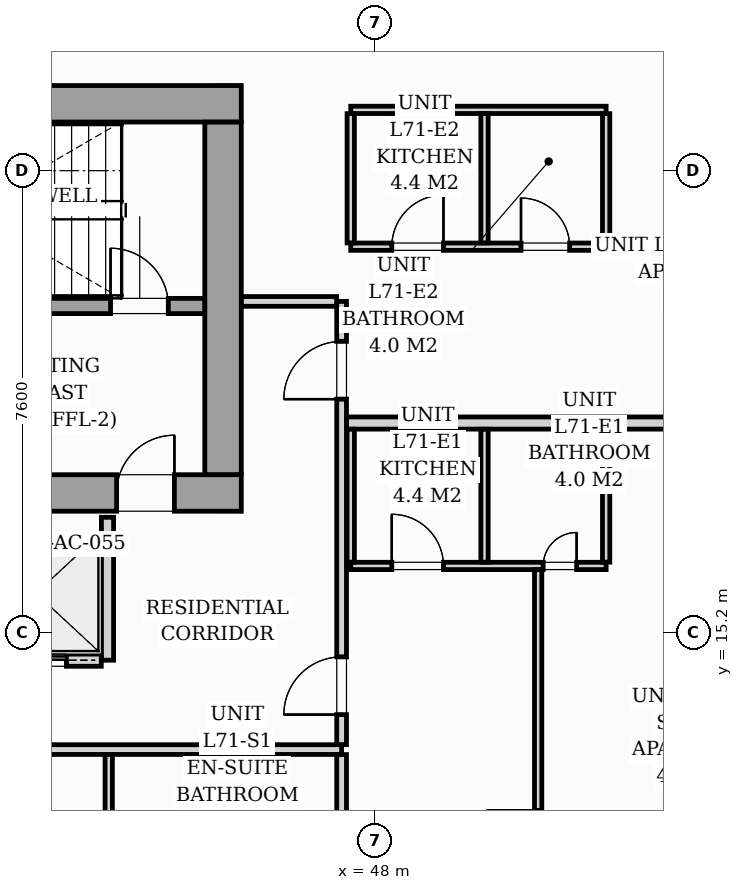
"""IFC4 building model, lengths in metres.
Left out: names, types, materials, properties, quantities, classifications, styles, units other than length and angle.
Written with IfcOpenShell. Run it as: python <this file> out.ifc"""

import sys

from ifc_helpers import new_model, si_unit, direction, frame, frame_2d, origin, origin_2d, place, context, subcontext, project, spatial, rectangle, i_section, extrude, source, transform, mapped, element, fill, save


model = new_model("IFC4")
c1 = context("Model", 3, precision=1e-05, world=origin(), true_north=direction((0.0, 1.0)))
c2 = subcontext(c1, "Body", "Model", "MODEL_VIEW")
j1 = project(units=[si_unit("LENGTHUNIT", "METRE"), si_unit("PLANEANGLEUNIT", "RADIAN")], contexts=[c1])
p1 = place(None, origin())
s1 = spatial("IfcSite", under=j1, at=p1, CompositionType="ELEMENT")
p2 = place(p1, origin())
s2 = spatial("IfcBuilding", under=s1, at=p2, CompositionType="ELEMENT")
p3 = place(p2, frame((0.0, 0.0, 246.3)))
s3 = spatial("IfcBuildingStorey", under=s2, at=p3, CompositionType="ELEMENT", Elevation=246.3)
m1 = source(origin(), c2, "Body", "SweptSolid", [
    extrude(i_section(OverallWidth=0.409, OverallDepth=0.425, WebThickness=0.033, FlangeThickness=0.052, FilletRadius=0.018, at=origin_2d()), origin(), (0.0, 0.0, 1.0), 3.296),
])
for number, where, z_axis, x_axis in (
    (1, (45.6, 17.4, 0.002), (0.0, 0.0, 1.0), (1.0, 0.0, 0.0)),
    (2, (45.6, 24.0, 0.002), (0.0, 0.0, 1.0), (1.0, 0.0, 0.0)),
):
    element("IfcColumn", number, at=place(p3, frame(where, z_axis=z_axis, x_axis=x_axis)), inside=s3, PredefinedType="PILASTER", context=c2, shape_type="MappedRepresentation", body=[
        mapped(m1, transform((0.0, 0.0, 0.0), scale=1.0)),
    ])
p4 = place(p3, frame((39.839, 26.166, 0.0), z_axis=(0.0, 0.0, 1.0), x_axis=(0.995884447498, -0.090632043071, 0.0)))
e3 = element("IfcWall", 3, at=p4, inside=s3, PredefinedType="STANDARD", context=c2, shape_type="SweptSolid", body=[
    extrude(rectangle(XDim=14.63, YDim=0.26, at=frame_2d((7.315, 0.0))), origin(), (0.0, 0.0, 1.0), 3.04),
])
p5 = place(p4, frame((7.9, 0.0, 0.0)))
e4 = element("IfcOpeningElement", 4, at=p5, cuts=e3, PredefinedType="OPENING", context=c2, shape_type="SweptSolid", body=[
    extrude(rectangle(XDim=1.8, YDim=2.06, at=frame_2d((0.9, 1.03))), frame((0.0, 0.14, 0.0), z_axis=(0.0, -1.0, 0.0), x_axis=(1.0, 0.0, 0.0)), (0.0, 0.0, 1.0), 0.28),
])
p6 = place(p4, frame((0.7, 0.0, 0.65)))
e5 = element("IfcOpeningElement", 5, at=p6, cuts=e3, PredefinedType="OPENING", context=c2, shape_type="SweptSolid", body=[
    extrude(rectangle(XDim=1.6, YDim=1.5, at=frame_2d((0.8, 0.75))), frame((0.0, 0.14, 0.0), z_axis=(0.0, -1.0, 0.0), x_axis=(1.0, 0.0, 0.0)), (0.0, 0.0, 1.0), 0.28),
])
p7 = place(p3, frame((26.2, 17.5, 0.0), z_axis=(0.0, 0.0, 1.0), x_axis=(1.0, 0.0, 0.0)))
e6 = element("IfcWall", 6, at=p7, inside=s3, PredefinedType="SHEAR", context=c2, shape_type="SweptSolid", body=[
    extrude(rectangle(XDim=19.6, YDim=0.6, at=frame_2d((9.8, 0.0))), origin(), (0.0, 0.0, 1.0), 3.3),
])
p8 = place(p7, frame((0.95, 0.0, 0.0)))
e7 = element("IfcOpeningElement", 7, at=p8, cuts=e6, PredefinedType="OPENING", context=c2, shape_type="SweptSolid", body=[
    extrude(rectangle(XDim=0.95, YDim=2.06, at=frame_2d((0.475, 1.03))), frame((0.0, 0.31, 0.0), z_axis=(0.0, -1.0, 0.0), x_axis=(1.0, 0.0, 0.0)), (0.0, 0.0, 1.0), 0.62),
])
p9 = place(p7, frame((9.38, 0.0, 0.0)))
e8 = element("IfcOpeningElement", 8, at=p9, cuts=e6, PredefinedType="OPENING", context=c2, shape_type="SweptSolid", body=[
    extrude(rectangle(XDim=0.85, YDim=2.0, at=frame_2d((0.425, 1.0))), frame((0.0, 0.31, 0.0), z_axis=(0.0, -1.0, 0.0), x_axis=(1.0, 0.0, 0.0)), (0.0, 0.0, 1.0), 0.62),
])
p10 = place(p7, frame((17.55, 0.0, 0.0)))
e9 = element("IfcOpeningElement", 9, at=p10, cuts=e6, PredefinedType="OPENING", context=c2, shape_type="SweptSolid", body=[
    extrude(rectangle(XDim=0.95, YDim=2.06, at=frame_2d((0.475, 1.03))), frame((0.0, 0.31, 0.0), z_axis=(0.0, -1.0, 0.0), x_axis=(1.0, 0.0, 0.0)), (0.0, 0.0, 1.0), 0.62),
])
p11 = place(p3, frame((26.2, 23.9, 0.0), z_axis=(0.0, 0.0, 1.0), x_axis=(1.0, 0.0, 0.0)))
e10 = element("IfcWall", 10, at=p11, inside=s3, PredefinedType="SHEAR", context=c2, shape_type="SweptSolid", body=[
    extrude(rectangle(XDim=19.6, YDim=0.6, at=frame_2d((9.8, 0.0))), origin(), (0.0, 0.0, 1.0), 3.3),
])
p12 = place(p3, frame((45.5, 17.802, 0.0), z_axis=(0.0, 0.0, 1.0), x_axis=(0.0, 1.0, 0.0)))
e11 = element("IfcWall", 11, at=p12, inside=s3, PredefinedType="SHEAR", context=c2, shape_type="SweptSolid", body=[
    extrude(rectangle(XDim=5.796, YDim=0.6, at=frame_2d((2.898, 0.0))), origin(), (0.0, 0.0, 1.0), 3.3),
])
p13 = place(p3, frame((37.05, 20.575, 0.0), z_axis=(0.0, 0.0, 1.0), x_axis=(1.0, 0.0, 0.0)))
e12 = element("IfcWall", 12, at=p13, inside=s3, PredefinedType="SOLIDWALL", context=c2, shape_type="SweptSolid", body=[
    extrude(rectangle(XDim=8.148, YDim=0.25, at=frame_2d((4.074, 0.0))), origin(), (0.0, 0.0, 1.0), 3.3),
])
p14 = place(p13, frame((6.6, 0.0, 0.0)))
e13 = element("IfcOpeningElement", 13, at=p14, cuts=e12, PredefinedType="OPENING", context=c2, shape_type="SweptSolid", body=[
    extrude(rectangle(XDim=0.95, YDim=2.06, at=frame_2d((0.475, 1.03))), frame((0.0, 0.135, 0.0), z_axis=(0.0, -1.0, 0.0), x_axis=(1.0, 0.0, 0.0)), (0.0, 0.0, 1.0), 0.27),
])
p15 = place(p3, frame((43.6, 14.75, 0.0), z_axis=(0.0, 0.0, 1.0), x_axis=(0.0, 1.0, 0.0)))
e14 = element("IfcWall", 14, at=p15, inside=s3, PredefinedType="PARTITIONING", context=c2, shape_type="SweptSolid", body=[
    extrude(rectangle(XDim=2.35, YDim=0.2, at=frame_2d((1.175, 0.0))), origin(), (0.0, 0.0, 1.0), 3.04),
])
p16 = place(p3, frame((41.352, 14.75, 0.0), z_axis=(0.0, 0.0, 1.0), x_axis=(1.0, 0.0, 0.0)))
e15 = element("IfcWall", 15, at=p16, inside=s3, PredefinedType="PARTITIONING", context=c2, shape_type="SweptSolid", body=[
    extrude(rectangle(XDim=2.146, YDim=0.2, at=frame_2d((1.073, 0.0))), origin(), (0.0, 0.0, 1.0), 3.04),
])
p17 = place(p16, frame((0.523, 0.0, 0.0)))
e16 = element("IfcOpeningElement", 16, at=p17, cuts=e15, PredefinedType="OPENING", context=c2, shape_type="SweptSolid", body=[
    extrude(rectangle(XDim=1.05, YDim=2.08, at=frame_2d((0.525, 1.04))), frame((0.0, 0.11, 0.0), z_axis=(0.0, -1.0, 0.0), x_axis=(1.0, 0.0, 0.0)), (0.0, 0.0, 1.0), 0.22),
])
p18 = place(p3, frame((24.55, 13.28, 0.0), z_axis=(0.0, 0.0, 1.0), x_axis=(1.0, 0.0, 0.0)))
e17 = element("IfcWall", 17, at=p18, inside=s3, PredefinedType="PARTITIONING", context=c2, shape_type="SweptSolid", body=[
    extrude(rectangle(XDim=22.9, YDim=0.16, at=frame_2d((11.45, 0.0))), origin(), (0.0, 0.0, 1.0), 2.556),
])
p19 = place(p18, frame((7.125, 0.0, 0.0)))
e18 = element("IfcOpeningElement", 18, at=p19, cuts=e17, PredefinedType="OPENING", context=c2, shape_type="SweptSolid", body=[
    extrude(rectangle(XDim=0.95, YDim=2.06, at=frame_2d((0.475, 1.03))), frame((0.0, 0.09, 0.0), z_axis=(0.0, -1.0, 0.0), x_axis=(1.0, 0.0, 0.0)), (0.0, 0.0, 1.0), 0.18),
])
p20 = place(p3, frame((47.45, 7.993, 0.0), z_axis=(0.0, 0.0, 1.0), x_axis=(0.0, 1.0, 0.0)))
e19 = element("IfcWall", 19, at=p20, inside=s3, PredefinedType="PARTITIONING", context=c2, shape_type="SweptSolid", body=[
    extrude(rectangle(XDim=5.205, YDim=0.16, at=frame_2d((2.603, 0.0))), origin(), (0.0, 0.0, 1.0), 3.04),
])
p21 = place(p3, frame((47.45, 13.362, 0.0), z_axis=(0.0, 0.0, 1.0), x_axis=(0.0, 1.0, 0.0)))
e20 = element("IfcWall", 20, at=p21, inside=s3, PredefinedType="PARTITIONING", context=c2, shape_type="SweptSolid", body=[
    extrude(rectangle(XDim=7.288, YDim=0.16, at=frame_2d((3.644, 0.0))), origin(), (0.0, 0.0, 1.0), 3.04),
])
p22 = place(p21, frame((0.493, 0.0, 0.0)))
e21 = element("IfcOpeningElement", 21, at=p22, cuts=e20, PredefinedType="OPENING", context=c2, shape_type="SweptSolid", body=[
    extrude(rectangle(XDim=0.95, YDim=2.06, at=frame_2d((0.475, 1.03))), frame((0.0, 0.09, 0.0), z_axis=(0.0, -1.0, 0.0), x_axis=(1.0, 0.0, 0.0)), (0.0, 0.0, 1.0), 0.18),
])
p23 = place(p21, frame((5.681, 0.0, 0.0)))
e22 = element("IfcOpeningElement", 22, at=p23, cuts=e20, PredefinedType="OPENING", context=c2, shape_type="SweptSolid", body=[
    extrude(rectangle(XDim=0.95, YDim=2.06, at=frame_2d((0.475, 1.03))), frame((0.0, 0.09, 0.0), z_axis=(0.0, -1.0, 0.0), x_axis=(1.0, 0.0, 0.0)), (0.0, 0.0, 1.0), 0.18),
])
p24 = place(p3, frame((45.802, 20.65, 0.0), z_axis=(0.0, 0.0, 1.0), x_axis=(1.0, 0.0, 0.0)))
e23 = element("IfcWall", 23, at=p24, inside=s3, PredefinedType="PARTITIONING", context=c2, shape_type="SweptSolid", body=[
    extrude(rectangle(XDim=1.566, YDim=0.16, at=frame_2d((0.783, 0.0))), origin(), (0.0, 0.0, 1.0), 3.04),
])
p25 = place(p3, frame((43.62, 8.342, 0.0), z_axis=(0.0, 0.0, 1.0), x_axis=(0.0, 1.0, 0.0)))
e24 = element("IfcWall", 24, at=p25, inside=s3, PredefinedType="PARTITIONING", context=c2, shape_type="SweptSolid", body=[
    extrude(rectangle(XDim=4.856, YDim=0.12, at=frame_2d((2.428, 0.0))), origin(), (0.0, 0.0, 1.0), 3.04),
])
p26 = place(p25, frame((2.0, 0.0, 0.0)))
e25 = element("IfcOpeningElement", 25, at=p26, cuts=e24, PredefinedType="OPENING", context=c2, shape_type="SweptSolid", body=[
    extrude(rectangle(XDim=0.55, YDim=2.0, at=frame_2d((0.275, 1.0))), frame((0.0, 0.07, 0.0), z_axis=(0.0, -1.0, 0.0), x_axis=(1.0, 0.0, 0.0)), (0.0, 0.0, 1.0), 0.14),
])
p27 = place(p3, frame((47.532, 18.65, 0.0), z_axis=(0.0, 0.0, 1.0), x_axis=(1.0, 0.0, 0.0)))
e26 = element("IfcWall", 26, at=p27, inside=s3, PredefinedType="PARTITIONING", context=c2, shape_type="SweptSolid", body=[
    extrude(rectangle(XDim=8.743, YDim=0.2, at=frame_2d((4.372, 0.0))), origin(), (0.0, 0.0, 1.0), 3.04),
])
p28 = place(p3, frame((47.6, 16.3, 0.0), z_axis=(0.0, 0.0, 1.0), x_axis=(1.0, 0.0, 0.0)))
e27 = element("IfcWall", 27, at=p28, inside=s3, PredefinedType="PARTITIONING", context=c2, shape_type="SweptSolid", body=[
    extrude(rectangle(XDim=4.2, YDim=0.12, at=frame_2d((2.1, 0.0))), origin(), (0.0, 0.0, 1.0), 2.381),
])
p29 = place(p28, frame((0.675, 0.0, 0.0)))
e28 = element("IfcOpeningElement", 28, at=p29, cuts=e27, PredefinedType="OPENING", context=c2, shape_type="SweptSolid", body=[
    extrude(rectangle(XDim=0.85, YDim=2.05, at=frame_2d((0.425, 1.025))), frame((0.0, 0.07, 0.0), z_axis=(0.0, -1.0, 0.0), x_axis=(1.0, 0.0, 0.0)), (0.0, 0.0, 1.0), 0.14),
])
p30 = place(p28, frame((3.165, 0.0, 0.0)))
e29 = element("IfcOpeningElement", 29, at=p30, cuts=e27, PredefinedType="OPENING", context=c2, shape_type="SweptSolid", body=[
    extrude(rectangle(XDim=0.55, YDim=2.0, at=frame_2d((0.275, 1.0))), frame((0.0, 0.07, 0.0), z_axis=(0.0, -1.0, 0.0), x_axis=(1.0, 0.0, 0.0)), (0.0, 0.0, 1.0), 0.14),
])
for number, where, z_axis, x_axis in (
    (30, (47.6, 16.362, 0.0), (0.0, 0.0, 1.0), (0.0, 1.0, 0.0)),
    (31, (49.8, 16.362, 0.0), (0.0, 0.0, 1.0), (0.0, 1.0, 0.0)),
    (32, (51.8, 16.362, 0.0), (0.0, 0.0, 1.0), (0.0, 1.0, 0.0)),
):
    element("IfcWall", number, at=place(p3, frame(where, z_axis=z_axis, x_axis=x_axis)), inside=s3, PredefinedType="PARTITIONING", context=c2, shape_type="SweptSolid", body=[
        extrude(rectangle(XDim=2.186, YDim=0.12, at=frame_2d((1.093, 0.0))), origin(), (0.0, 0.0, 1.0), 3.04),
    ])
p31 = place(p3, frame((50.682, 7.699, 0.0), z_axis=(0.0, 0.0, 1.0), x_axis=(0.0, 1.0, 0.0)))
e33 = element("IfcWall", 33, at=p31, inside=s3, PredefinedType="PARTITIONING", context=c2, shape_type="SweptSolid", body=[
    extrude(rectangle(XDim=8.539, YDim=0.12, at=frame_2d((4.27, 0.0))), origin(), (0.0, 0.0, 1.0), 3.04),
])
p32 = place(p31, frame((3.73, 0.0, 0.0)))
e34 = element("IfcOpeningElement", 34, at=p32, cuts=e33, PredefinedType="OPENING", context=c2, shape_type="SweptSolid", body=[
    extrude(rectangle(XDim=0.85, YDim=2.05, at=frame_2d((0.425, 1.025))), frame((0.0, 0.07, 0.0), z_axis=(0.0, -1.0, 0.0), x_axis=(1.0, 0.0, 0.0)), (0.0, 0.0, 1.0), 0.14),
])
p33 = place(p3, frame((47.6, 21.55, 0.0), z_axis=(0.0, 0.0, 1.0), x_axis=(1.0, 0.0, 0.0)))
e35 = element("IfcWall", 35, at=p33, inside=s3, PredefinedType="PARTITIONING", context=c2, shape_type="SweptSolid", body=[
    extrude(rectangle(XDim=4.2, YDim=0.12, at=frame_2d((2.1, 0.0))), origin(), (0.0, 0.0, 1.0), 3.04),
])
p34 = place(p33, frame((0.675, 0.0, 0.0)))
e36 = element("IfcOpeningElement", 36, at=p34, cuts=e35, PredefinedType="OPENING", context=c2, shape_type="SweptSolid", body=[
    extrude(rectangle(XDim=0.85, YDim=2.05, at=frame_2d((0.425, 1.025))), frame((0.0, 0.07, 0.0), z_axis=(0.0, -1.0, 0.0), x_axis=(1.0, 0.0, 0.0)), (0.0, 0.0, 1.0), 0.14),
])
p35 = place(p33, frame((2.8, 0.0, 0.0)))
e37 = element("IfcOpeningElement", 37, at=p35, cuts=e35, PredefinedType="OPENING", context=c2, shape_type="SweptSolid", body=[
    extrude(rectangle(XDim=0.8, YDim=2.02, at=frame_2d((0.4, 1.01))), frame((0.0, 0.07, 0.0), z_axis=(0.0, -1.0, 0.0), x_axis=(1.0, 0.0, 0.0)), (0.0, 0.0, 1.0), 0.14),
])
p36 = place(p3, frame((47.6, 23.8, 0.0), z_axis=(0.0, 0.0, 1.0), x_axis=(1.0, 0.0, 0.0)))
e38 = element("IfcWall", 38, at=p36, inside=s3, PredefinedType="PARTITIONING", context=c2, shape_type="SweptSolid", body=[
    extrude(rectangle(XDim=4.2, YDim=0.12, at=frame_2d((2.1, 0.0))), origin(), (0.0, 0.0, 1.0), 3.04),
])
for number, where, z_axis, x_axis in (
    (39, (47.6, 21.612, 0.0), (0.0, 0.0, 1.0), (0.0, 1.0, 0.0)),
    (40, (49.8, 21.612, 0.0), (0.0, 0.0, 1.0), (0.0, 1.0, 0.0)),
    (41, (51.8, 21.612, 0.0), (0.0, 0.0, 1.0), (0.0, 1.0, 0.0)),
):
    element("IfcWall", number, at=place(p3, frame(where, z_axis=z_axis, x_axis=x_axis)), inside=s3, PredefinedType="PARTITIONING", context=c2, shape_type="SweptSolid", body=[
        extrude(rectangle(XDim=2.126, YDim=0.12, at=frame_2d((1.063, 0.0))), origin(), (0.0, 0.0, 1.0), 3.04),
    ])
m2 = source(origin(), c2, "Body", "SweptSolid", [
    extrude(rectangle(XDim=0.95, YDim=2.06, at=frame_2d((0.475, 1.03))), frame((0.0, 0.025, 0.0), z_axis=(0.0, -1.0, 0.0), x_axis=(1.0, 0.0, 0.0)), (0.0, 0.0, 1.0), 0.05),
])
p37 = place(p10, origin())
e42 = element("IfcDoor", 42, at=p37, inside=s3, OperationType="SINGLE_SWING_RIGHT", PredefinedType="DOOR", context=c2, shape_type="MappedRepresentation", body=[
    mapped(m2, transform((0.0, 0.0, 0.0), scale=1.0)),
])
fill(e9, e42)
p38 = place(p14, origin())
e43 = element("IfcDoor", 43, at=p38, inside=s3, OperationType="SINGLE_SWING_LEFT", PredefinedType="DOOR", context=c2, shape_type="MappedRepresentation", body=[
    mapped(m2, transform((0.0, 0.0, 0.0), scale=1.0)),
])
fill(e13, e43)
m3 = source(origin(), c2, "Body", "SweptSolid", [
    extrude(rectangle(XDim=1.05, YDim=2.08, at=frame_2d((0.525, 1.04))), frame((0.0, 0.025, 0.0), z_axis=(0.0, -1.0, 0.0), x_axis=(1.0, 0.0, 0.0)), (0.0, 0.0, 1.0), 0.05),
])
p39 = place(p17, origin())
e44 = element("IfcDoor", 44, at=p39, inside=s3, OperationType="SLIDING_TO_RIGHT", PredefinedType="DOOR", context=c2, shape_type="MappedRepresentation", body=[
    mapped(m3, transform((0.0, 0.0, 0.0), scale=1.0)),
])
fill(e16, e44)
m4 = source(origin(), c2, "Body", "SweptSolid", [
    extrude(rectangle(XDim=0.95, YDim=2.06, at=frame_2d((0.475, 1.03))), frame((0.0, 0.025, 0.0), z_axis=(0.0, -1.0, 0.0), x_axis=(1.0, 0.0, 0.0)), (0.0, 0.0, 1.0), 0.05),
])
p40 = place(p22, origin())
e45 = element("IfcDoor", 45, at=p40, inside=s3, OperationType="SINGLE_SWING_LEFT", PredefinedType="DOOR", context=c2, shape_type="MappedRepresentation", body=[
    mapped(m4, transform((0.0, 0.0, 0.0), scale=1.0)),
])
fill(e21, e45)
m5 = source(origin(), c2, "Body", "SweptSolid", [
    extrude(rectangle(XDim=0.85, YDim=2.05, at=frame_2d((0.425, 1.025))), frame((0.0, 0.025, 0.0), z_axis=(0.0, -1.0, 0.0), x_axis=(1.0, 0.0, 0.0)), (0.0, 0.0, 1.0), 0.05),
])
p41 = place(p29, origin())
e46 = element("IfcDoor", 46, at=p41, inside=s3, OperationType="SINGLE_SWING_LEFT", PredefinedType="DOOR", context=c2, shape_type="MappedRepresentation", body=[
    mapped(m5, transform((0.0, 0.0, 0.0), scale=1.0)),
])
fill(e28, e46)
m6 = source(origin(), c2, "Body", "SweptSolid", [
    extrude(rectangle(XDim=0.55, YDim=2.0, at=frame_2d((0.275, 1.0))), frame((0.0, 0.025, 0.0), z_axis=(0.0, -1.0, 0.0), x_axis=(1.0, 0.0, 0.0)), (0.0, 0.0, 1.0), 0.05),
])
p42 = place(p30, origin())
e47 = element("IfcDoor", 47, at=p42, inside=s3, OperationType="SINGLE_SWING_RIGHT", PredefinedType="DOOR", context=c2, shape_type="MappedRepresentation", body=[
    mapped(m6, transform((0.0, 0.0, 0.0), scale=1.0)),
])
fill(e29, e47)
p43 = place(p23, origin())
e48 = element("IfcDoor", 48, at=p43, inside=s3, OperationType="SINGLE_SWING_LEFT", PredefinedType="DOOR", context=c2, shape_type="MappedRepresentation", body=[
    mapped(m4, transform((0.0, 0.0, 0.0), scale=1.0)),
])
fill(e22, e48)
p44 = place(p34, origin())
e49 = element("IfcDoor", 49, at=p44, inside=s3, OperationType="SINGLE_SWING_RIGHT", PredefinedType="DOOR", context=c2, shape_type="MappedRepresentation", body=[
    mapped(m5, transform((0.0, 0.0, 0.0), scale=1.0)),
])
fill(e36, e49)
m7 = source(origin(), c2, "Body", "SweptSolid", [
    extrude(rectangle(XDim=0.8, YDim=2.02, at=frame_2d((0.4, 1.01))), frame((0.0, 0.025, 0.0), z_axis=(0.0, -1.0, 0.0), x_axis=(1.0, 0.0, 0.0)), (0.0, 0.0, 1.0), 0.05),
])
p45 = place(p35, origin())
e50 = element("IfcDoor", 50, at=p45, inside=s3, OperationType="SINGLE_SWING_LEFT", PredefinedType="DOOR", context=c2, shape_type="MappedRepresentation", body=[
    mapped(m7, transform((0.0, 0.0, 0.0), scale=1.0)),
])
fill(e37, e50)
save(model, sys.argv[1])
